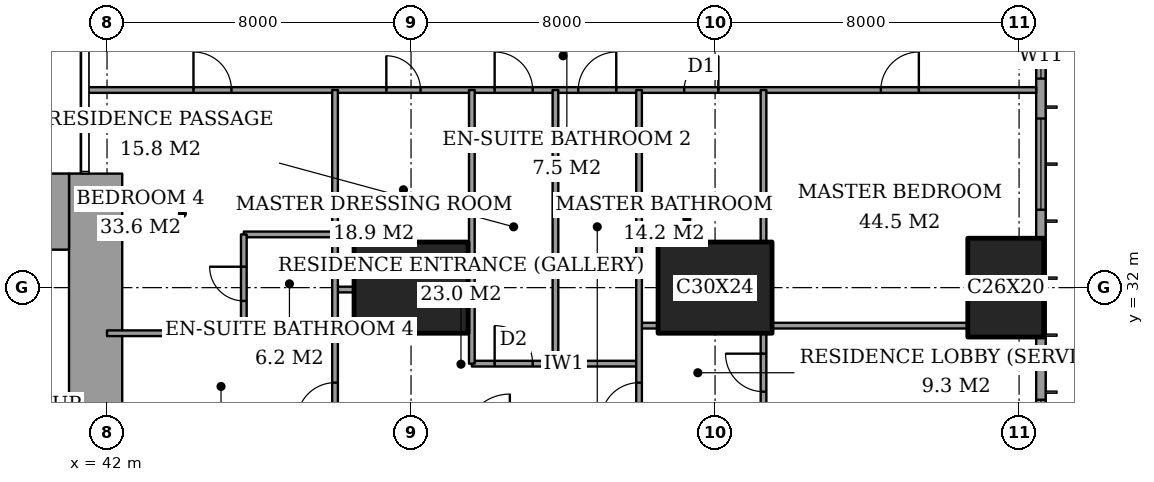
"""IFC4 building model, lengths in metres.
Left out: names, types, materials, properties, quantities, classifications, styles, units other than length and angle.
Written with IfcOpenShell. Run it as: python <this file> out.ifc"""

import sys

from ifc_helpers import new_model, si_unit, direction, frame, frame_2d, origin, origin_2d, place, context, subcontext, project, spatial, rectangle, extrude, element, fill, save


model = new_model("IFC4")
c1 = context("Model", 3, precision=1e-05, world=origin(), true_north=direction((0.0, 1.0)))
c2 = subcontext(c1, "Body", "Model", "MODEL_VIEW")
j1 = project(units=[si_unit("LENGTHUNIT", "METRE"), si_unit("PLANEANGLEUNIT", "RADIAN")], contexts=[c1])
p1 = place(None, origin())
s1 = spatial("IfcSite", under=j1, at=p1, CompositionType="ELEMENT")
p2 = place(p1, origin())
s2 = spatial("IfcBuilding", under=s1, at=p2, CompositionType="ELEMENT")
p3 = place(p2, frame((0.0, 0.0, 143.0)))
s3 = spatial("IfcBuildingStorey", under=s2, at=p3, CompositionType="ELEMENT", Elevation=143.0)
for number, where, z_axis, x_axis in (
    (1, (50.0, 32.0, 0.0), (0.0, 0.0, 1.0), (1.0, 0.0, 0.0)),
    (2, (58.0, 32.0, 0.0), (0.0, 0.0, 1.0), (1.0, 0.0, 0.0)),
):
    element("IfcColumn", number, at=place(p3, frame(where, z_axis=z_axis, x_axis=x_axis)), inside=s3, PredefinedType="COLUMN", context=c2, shape_type="SweptSolid", body=[
        extrude(rectangle(XDim=3.0, YDim=2.4, at=origin_2d()), origin(), (0.0, 0.0, 1.0), 3.6),
    ])
p4 = place(p3, frame((65.65, 32.0, 0.0), z_axis=(0.0, 0.0, 1.0), x_axis=(0.0, 1.0, 0.0)))
e3 = element("IfcColumn", 3, at=p4, inside=s3, PredefinedType="COLUMN", context=c2, shape_type="SweptSolid", body=[
    extrude(rectangle(XDim=2.6, YDim=2.0, at=origin_2d()), origin(), (0.0, 0.0, 1.0), 3.6),
])
p5 = place(p3, frame((37.85, 34.0, 0.0), z_axis=(0.0, 0.0, 1.0), x_axis=(1.0, 0.0, 0.0)))
e4 = element("IfcWall", 4, at=p5, inside=s3, PredefinedType="SHEAR", context=c2, shape_type="SweptSolid", body=[
    extrude(rectangle(XDim=3.15, YDim=2.0, at=frame_2d((1.575, 0.0))), origin(), (0.0, 0.0, 1.0), 3.6),
])
p6 = place(p3, frame((41.7, 24.85, 0.0), z_axis=(0.0, 0.0, 1.0), x_axis=(0.0, 1.0, 0.0)))
e5 = element("IfcWall", 5, at=p6, inside=s3, PredefinedType="SHEAR", context=c2, shape_type="SweptSolid", body=[
    extrude(rectangle(XDim=10.15, YDim=1.4, at=frame_2d((5.075, 0.0))), origin(), (0.0, 0.0, 1.0), 3.6),
])
p7 = place(p3, frame((66.575, 3.175, 0.0), z_axis=(0.0, 0.0, 1.0), x_axis=(0.0, 1.0, 0.0)))
e6 = element("IfcWall", 6, at=p7, inside=s3, PredefinedType="SOLIDWALL", context=c2, shape_type="SweptSolid", body=[
    extrude(rectangle(XDim=41.65, YDim=0.25, at=frame_2d((20.825, 0.0))), origin(), (0.0, 0.0, 1.0), 3.6),
])
p8 = place(p7, frame((0.775, 0.0, 0.4)))
e7 = element("IfcOpeningElement", 7, at=p8, cuts=e6, PredefinedType="OPENING", context=c2, shape_type="SweptSolid", body=[
    extrude(rectangle(XDim=2.4, YDim=2.2, at=frame_2d((1.2, 1.1))), frame((0.0, 0.135, 0.0), z_axis=(0.0, -1.0, 0.0), x_axis=(1.0, 0.0, 0.0)), (0.0, 0.0, 1.0), 0.27),
])
p9 = place(p7, frame((6.1, 0.0, 0.4)))
e8 = element("IfcOpeningElement", 8, at=p9, cuts=e6, PredefinedType="OPENING", context=c2, shape_type="SweptSolid", body=[
    extrude(rectangle(XDim=1.2, YDim=2.2, at=frame_2d((0.6, 1.1))), frame((0.0, 0.135, 0.0), z_axis=(0.0, -1.0, 0.0), x_axis=(1.0, 0.0, 0.0)), (0.0, 0.0, 1.0), 0.27),
])
p10 = place(p7, frame((8.275, 0.0, 0.4)))
e9 = element("IfcOpeningElement", 9, at=p10, cuts=e6, PredefinedType="OPENING", context=c2, shape_type="SweptSolid", body=[
    extrude(rectangle(XDim=2.4, YDim=2.2, at=frame_2d((1.2, 1.1))), frame((0.0, 0.135, 0.0), z_axis=(0.0, -1.0, 0.0), x_axis=(1.0, 0.0, 0.0)), (0.0, 0.0, 1.0), 0.27),
])
p11 = place(p7, frame((15.775, 0.0, 0.4)))
e10 = element("IfcOpeningElement", 10, at=p11, cuts=e6, PredefinedType="OPENING", context=c2, shape_type="SweptSolid", body=[
    extrude(rectangle(XDim=2.4, YDim=2.2, at=frame_2d((1.2, 1.1))), frame((0.0, 0.135, 0.0), z_axis=(0.0, -1.0, 0.0), x_axis=(1.0, 0.0, 0.0)), (0.0, 0.0, 1.0), 0.27),
])
p12 = place(p7, frame((23.475, 0.0, 0.4)))
e11 = element("IfcOpeningElement", 11, at=p12, cuts=e6, PredefinedType="OPENING", context=c2, shape_type="SweptSolid", body=[
    extrude(rectangle(XDim=2.4, YDim=2.2, at=frame_2d((1.2, 1.1))), frame((0.0, 0.135, 0.0), z_axis=(0.0, -1.0, 0.0), x_axis=(1.0, 0.0, 0.0)), (0.0, 0.0, 1.0), 0.27),
])
p13 = place(p7, frame((30.875, 0.0, 0.4)))
e12 = element("IfcOpeningElement", 12, at=p13, cuts=e6, PredefinedType="OPENING", context=c2, shape_type="SweptSolid", body=[
    extrude(rectangle(XDim=2.4, YDim=2.2, at=frame_2d((1.2, 1.1))), frame((0.0, 0.135, 0.0), z_axis=(0.0, -1.0, 0.0), x_axis=(1.0, 0.0, 0.0)), (0.0, 0.0, 1.0), 0.27),
])
p14 = place(p7, frame((34.325, 0.0, 0.4)))
e13 = element("IfcOpeningElement", 13, at=p14, cuts=e6, PredefinedType="OPENING", context=c2, shape_type="SweptSolid", body=[
    extrude(rectangle(XDim=1.2, YDim=2.2, at=frame_2d((0.6, 1.1))), frame((0.0, 0.135, 0.0), z_axis=(0.0, -1.0, 0.0), x_axis=(1.0, 0.0, 0.0)), (0.0, 0.0, 1.0), 0.27),
])
p15 = place(p7, frame((38.475, 0.0, 0.4)))
e14 = element("IfcOpeningElement", 14, at=p15, cuts=e6, PredefinedType="OPENING", context=c2, shape_type="SweptSolid", body=[
    extrude(rectangle(XDim=2.4, YDim=2.2, at=frame_2d((1.2, 1.1))), frame((0.0, 0.135, 0.0), z_axis=(0.0, -1.0, 0.0), x_axis=(1.0, 0.0, 0.0)), (0.0, 0.0, 1.0), 0.27),
])
p16 = place(p3, frame((51.6, 30.0, 0.0), z_axis=(0.0, 0.0, 1.0), x_axis=(1.0, 0.0, 0.0)))
e15 = element("IfcWall", 15, at=p16, inside=s3, PredefinedType="PARTITIONING", context=c2, shape_type="SweptSolid", body=[
    extrude(rectangle(XDim=4.4, YDim=0.15, at=frame_2d((2.2, 0.0))), origin(), (0.0, 0.0, 1.0), 3.35),
])
p17 = place(p16, frame((0.6, 0.0, 0.0)))
e16 = element("IfcOpeningElement", 16, at=p17, cuts=e15, PredefinedType="OPENING", context=c2, shape_type="SweptSolid", body=[
    extrude(rectangle(XDim=1.0, YDim=2.1, at=frame_2d((0.5, 1.05))), frame((0.0, 0.085, 0.0), z_axis=(0.0, -1.0, 0.0), x_axis=(1.0, 0.0, 0.0)), (0.0, 0.0, 1.0), 0.17),
])
p18 = place(p3, frame((42.0, 30.8, 0.0), z_axis=(0.0, 0.0, 1.0), x_axis=(1.0, 0.0, 0.0)))
e17 = element("IfcWall", 17, at=p18, inside=s3, PredefinedType="PARTITIONING", context=c2, shape_type="SweptSolid", body=[
    extrude(rectangle(XDim=6.0, YDim=0.15, at=frame_2d((3.0, 0.0))), origin(), (0.0, 0.0, 1.0), 3.35),
])
p19 = place(p3, frame((56.0, 31.0, 0.0), z_axis=(0.0, 0.0, 1.0), x_axis=(1.0, 0.0, 0.0)))
e18 = element("IfcWall", 18, at=p19, inside=s3, PredefinedType="PARTITIONING", context=c2, shape_type="SweptSolid", body=[
    extrude(rectangle(XDim=0.5, YDim=0.15, at=frame_2d((0.25, 0.0))), origin(), (0.0, 0.0, 1.0), 3.35),
])
p20 = place(p3, frame((59.5, 31.0, 0.0), z_axis=(0.0, 0.0, 1.0), x_axis=(1.0, 0.0, 0.0)))
e19 = element("IfcWall", 19, at=p20, inside=s3, PredefinedType="PARTITIONING", context=c2, shape_type="SweptSolid", body=[
    extrude(rectangle(XDim=5.15, YDim=0.15, at=frame_2d((2.575, 0.0))), origin(), (0.0, 0.0, 1.0), 3.35),
])
p21 = place(p3, frame((48.0, 31.95, 0.0), z_axis=(0.0, 0.0, 1.0), x_axis=(1.0, 0.0, 0.0)))
e20 = element("IfcWall", 20, at=p21, inside=s3, PredefinedType="PARTITIONING", context=c2, shape_type="SweptSolid", body=[
    extrude(rectangle(XDim=0.5, YDim=0.15, at=frame_2d((0.25, 0.0))), origin(), (0.0, 0.0, 1.0), 2.634),
])
p22 = place(p3, frame((45.6, 33.4, 0.0), z_axis=(0.0, 0.0, 1.0), x_axis=(1.0, 0.0, 0.0)))
e21 = element("IfcWall", 21, at=p22, inside=s3, PredefinedType="PARTITIONING", context=c2, shape_type="SweptSolid", body=[
    extrude(rectangle(XDim=2.4, YDim=0.15, at=frame_2d((1.2, 0.0))), origin(), (0.0, 0.0, 1.0), 3.35),
])
p23 = place(p3, frame((41.439, 37.2, 0.0), z_axis=(0.0, 0.0, 1.0), x_axis=(1.0, 0.0, 0.0)))
e22 = element("IfcWall", 22, at=p23, inside=s3, PredefinedType="PARTITIONING", context=c2, shape_type="SweptSolid", body=[
    extrude(rectangle(XDim=25.011, YDim=0.15, at=frame_2d((12.505, 0.0))), origin(), (0.0, 0.0, 1.0), 3.35),
])
p24 = place(p23, frame((10.761, 0.0, 0.0)))
e23 = element("IfcOpeningElement", 23, at=p24, cuts=e22, PredefinedType="OPENING", context=c2, shape_type="SweptSolid", body=[
    extrude(rectangle(XDim=1.0, YDim=2.1, at=frame_2d((0.5, 1.05))), frame((0.0, 0.085, 0.0), z_axis=(0.0, -1.0, 0.0), x_axis=(1.0, 0.0, 0.0)), (0.0, 0.0, 1.0), 0.17),
])
p25 = place(p23, frame((20.924, 0.0, 0.0)))
e24 = element("IfcOpeningElement", 24, at=p25, cuts=e22, PredefinedType="OPENING", context=c2, shape_type="SweptSolid", body=[
    extrude(rectangle(XDim=1.0, YDim=2.1, at=frame_2d((0.5, 1.05))), frame((0.0, 0.085, 0.0), z_axis=(0.0, -1.0, 0.0), x_axis=(1.0, 0.0, 0.0)), (0.0, 0.0, 1.0), 0.17),
])
p26 = place(p23, frame((15.749, 0.0, 0.0)))
e25 = element("IfcOpeningElement", 25, at=p26, cuts=e22, PredefinedType="OPENING", context=c2, shape_type="SweptSolid", body=[
    extrude(rectangle(XDim=0.9, YDim=2.1, at=frame_2d((0.45, 1.05))), frame((0.0, 0.085, 0.0), z_axis=(0.0, -1.0, 0.0), x_axis=(1.0, 0.0, 0.0)), (0.0, 0.0, 1.0), 0.17),
])
p27 = place(p23, frame((12.961, 0.0, 0.0)))
e26 = element("IfcOpeningElement", 26, at=p27, cuts=e22, PredefinedType="OPENING", context=c2, shape_type="SweptSolid", body=[
    extrude(rectangle(XDim=1.0, YDim=2.1, at=frame_2d((0.5, 1.05))), frame((0.0, 0.085, 0.0), z_axis=(0.0, -1.0, 0.0), x_axis=(1.0, 0.0, 0.0)), (0.0, 0.0, 1.0), 0.17),
])
p28 = place(p23, frame((7.911, 0.0, 0.0)))
e27 = element("IfcOpeningElement", 27, at=p28, cuts=e22, PredefinedType="OPENING", context=c2, shape_type="SweptSolid", body=[
    extrude(rectangle(XDim=0.9, YDim=2.1, at=frame_2d((0.45, 1.05))), frame((0.0, 0.085, 0.0), z_axis=(0.0, -1.0, 0.0), x_axis=(1.0, 0.0, 0.0)), (0.0, 0.0, 1.0), 0.17),
])
p29 = place(p23, frame((2.836, 0.0, 0.0)))
e28 = element("IfcOpeningElement", 28, at=p29, cuts=e22, PredefinedType="OPENING", context=c2, shape_type="SweptSolid", body=[
    extrude(rectangle(XDim=1.0, YDim=2.1, at=frame_2d((0.5, 1.05))), frame((0.0, 0.085, 0.0), z_axis=(0.0, -1.0, 0.0), x_axis=(1.0, 0.0, 0.0)), (0.0, 0.0, 1.0), 0.17),
])
p30 = place(p3, frame((45.6, 30.8, 0.0), z_axis=(0.0, 0.0, 1.0), x_axis=(0.0, 1.0, 0.0)))
e29 = element("IfcWall", 29, at=p30, inside=s3, PredefinedType="PARTITIONING", context=c2, shape_type="SweptSolid", body=[
    extrude(rectangle(XDim=2.6, YDim=0.15, at=frame_2d((1.3, 0.0))), origin(), (0.0, 0.0, 1.0), 3.35),
])
p31 = place(p30, frame((0.85, 0.0, 0.0)))
e30 = element("IfcOpeningElement", 30, at=p31, cuts=e29, PredefinedType="OPENING", context=c2, shape_type="SweptSolid", body=[
    extrude(rectangle(XDim=0.9, YDim=2.1, at=frame_2d((0.45, 1.05))), frame((0.0, 0.085, 0.0), z_axis=(0.0, -1.0, 0.0), x_axis=(1.0, 0.0, 0.0)), (0.0, 0.0, 1.0), 0.17),
])
p32 = place(p3, frame((48.0, 28.0, 0.0), z_axis=(0.0, 0.0, 1.0), x_axis=(0.0, 1.0, 0.0)))
e31 = element("IfcWall", 31, at=p32, inside=s3, PredefinedType="PARTITIONING", context=c2, shape_type="SweptSolid", body=[
    extrude(rectangle(XDim=9.2, YDim=0.15, at=frame_2d((4.6, 0.0))), origin(), (0.0, 0.0, 1.0), 3.35),
])
p33 = place(p32, frame((0.5, 0.0, 0.0)))
e32 = element("IfcOpeningElement", 32, at=p33, cuts=e31, PredefinedType="OPENING", context=c2, shape_type="SweptSolid", body=[
    extrude(rectangle(XDim=1.0, YDim=2.1, at=frame_2d((0.5, 1.05))), frame((0.0, 0.085, 0.0), z_axis=(0.0, -1.0, 0.0), x_axis=(1.0, 0.0, 0.0)), (0.0, 0.0, 1.0), 0.17),
])
for number, where, z_axis, x_axis in (
    (33, (51.6, 30.0, 0.0), (0.0, 0.0, 1.0), (0.0, 1.0, 0.0)),
    (34, (53.8, 30.0, 0.0), (0.0, 0.0, 1.0), (0.0, 1.0, 0.0)),
):
    element("IfcWall", number, at=place(p3, frame(where, z_axis=z_axis, x_axis=x_axis)), inside=s3, PredefinedType="PARTITIONING", context=c2, shape_type="SweptSolid", body=[
        extrude(rectangle(XDim=7.2, YDim=0.15, at=frame_2d((3.6, 0.0))), origin(), (0.0, 0.0, 1.0), 3.35),
    ])
p34 = place(p3, frame((56.0, 28.0, 0.0), z_axis=(0.0, 0.0, 1.0), x_axis=(0.0, 1.0, 0.0)))
e35 = element("IfcWall", 35, at=p34, inside=s3, PredefinedType="PARTITIONING", context=c2, shape_type="SweptSolid", body=[
    extrude(rectangle(XDim=9.2, YDim=0.15, at=frame_2d((4.6, 0.0))), origin(), (0.0, 0.0, 1.0), 3.35),
])
p35 = place(p34, frame((0.5, 0.0, 0.0)))
e36 = element("IfcOpeningElement", 36, at=p35, cuts=e35, PredefinedType="OPENING", context=c2, shape_type="SweptSolid", body=[
    extrude(rectangle(XDim=1.0, YDim=2.1, at=frame_2d((0.5, 1.05))), frame((0.0, 0.085, 0.0), z_axis=(0.0, -1.0, 0.0), x_axis=(1.0, 0.0, 0.0)), (0.0, 0.0, 1.0), 0.17),
])
p36 = place(p3, frame((59.275, 28.35, 0.0), z_axis=(0.0, 0.0, 1.0), x_axis=(0.0, 1.0, 0.0)))
e37 = element("IfcWall", 37, at=p36, inside=s3, PredefinedType="PARTITIONING", context=c2, shape_type="SweptSolid", body=[
    extrude(rectangle(XDim=2.45, YDim=0.15, at=frame_2d((1.225, 0.0))), origin(), (0.0, 0.0, 1.0), 3.35),
])
p37 = place(p36, frame((0.913, 0.0, 0.0)))
e38 = element("IfcOpeningElement", 38, at=p37, cuts=e37, PredefinedType="OPENING", context=c2, shape_type="SweptSolid", body=[
    extrude(rectangle(XDim=1.0, YDim=2.1, at=frame_2d((0.5, 1.05))), frame((0.0, 0.085, 0.0), z_axis=(0.0, -1.0, 0.0), x_axis=(1.0, 0.0, 0.0)), (0.0, 0.0, 1.0), 0.17),
])
p38 = place(p3, frame((59.275, 33.2, 0.0), z_axis=(0.0, 0.0, 1.0), x_axis=(0.0, 1.0, 0.0)))
e39 = element("IfcWall", 39, at=p38, inside=s3, PredefinedType="PARTITIONING", context=c2, shape_type="SweptSolid", body=[
    extrude(rectangle(XDim=4.0, YDim=0.15, at=frame_2d((2.0, 0.0))), origin(), (0.0, 0.0, 1.0), 3.35),
])
p39 = place(p12, origin())
e40 = element("IfcWindow", 40, at=p39, inside=s3, PartitioningType="SINGLE_PANEL", PredefinedType="WINDOW", context=c2, shape_type="SweptSolid", body=[
    extrude(rectangle(XDim=2.4, YDim=2.2, at=frame_2d((1.2, 1.1))), frame((0.0, 0.03, 0.0), z_axis=(0.0, -1.0, 0.0), x_axis=(1.0, 0.0, 0.0)), (0.0, 0.0, 1.0), 0.06),
])
fill(e11, e40)
p40 = place(p13, origin())
e41 = element("IfcWindow", 41, at=p40, inside=s3, PartitioningType="SINGLE_PANEL", PredefinedType="WINDOW", context=c2, shape_type="SweptSolid", body=[
    extrude(rectangle(XDim=2.4, YDim=2.2, at=frame_2d((1.2, 1.1))), frame((0.0, 0.03, 0.0), z_axis=(0.0, -1.0, 0.0), x_axis=(1.0, 0.0, 0.0)), (0.0, 0.0, 1.0), 0.06),
])
fill(e12, e41)
p41 = place(p14, origin())
e42 = element("IfcWindow", 42, at=p41, inside=s3, PartitioningType="SINGLE_PANEL", PredefinedType="WINDOW", context=c2, shape_type="SweptSolid", body=[
    extrude(rectangle(XDim=1.2, YDim=2.2, at=frame_2d((0.6, 1.1))), frame((0.0, 0.03, 0.0), z_axis=(0.0, -1.0, 0.0), x_axis=(1.0, 0.0, 0.0)), (0.0, 0.0, 1.0), 0.06),
])
fill(e13, e42)
p42 = place(p24, origin())
e43 = element("IfcDoor", 43, at=p42, inside=s3, OperationType="SINGLE_SWING_RIGHT", PredefinedType="DOOR", context=c2, shape_type="SweptSolid", body=[
    extrude(rectangle(XDim=1.0, YDim=2.1, at=frame_2d((0.5, 1.05))), frame((0.0, 0.025, 0.0), z_axis=(0.0, -1.0, 0.0), x_axis=(1.0, 0.0, 0.0)), (0.0, 0.0, 1.0), 0.05),
])
fill(e23, e43)
p43 = place(p25, origin())
e44 = element("IfcDoor", 44, at=p43, inside=s3, OperationType="SINGLE_SWING_LEFT", PredefinedType="DOOR", context=c2, shape_type="SweptSolid", body=[
    extrude(rectangle(XDim=1.0, YDim=2.1, at=frame_2d((0.5, 1.05))), frame((0.0, 0.025, 0.0), z_axis=(0.0, -1.0, 0.0), x_axis=(1.0, 0.0, 0.0)), (0.0, 0.0, 1.0), 0.05),
])
fill(e24, e44)
p44 = place(p37, origin())
e45 = element("IfcDoor", 45, at=p44, inside=s3, OperationType="SINGLE_SWING_LEFT", PredefinedType="DOOR", context=c2, shape_type="SweptSolid", body=[
    extrude(rectangle(XDim=1.0, YDim=2.1, at=frame_2d((0.5, 1.05))), frame((0.0, 0.025, 0.0), z_axis=(0.0, -1.0, 0.0), x_axis=(1.0, 0.0, 0.0)), (0.0, 0.0, 1.0), 0.05),
])
fill(e38, e45)
p45 = place(p26, origin())
e46 = element("IfcDoor", 46, at=p45, inside=s3, OperationType="SINGLE_SWING_LEFT", PredefinedType="DOOR", context=c2, shape_type="SweptSolid", body=[
    extrude(rectangle(XDim=0.9, YDim=2.1, at=frame_2d((0.45, 1.05))), frame((0.0, 0.025, 0.0), z_axis=(0.0, -1.0, 0.0), x_axis=(1.0, 0.0, 0.0)), (0.0, 0.0, 1.0), 0.05),
])
fill(e25, e46)
p46 = place(p35, origin())
e47 = element("IfcDoor", 47, at=p46, inside=s3, OperationType="SINGLE_SWING_RIGHT", PredefinedType="DOOR", context=c2, shape_type="SweptSolid", body=[
    extrude(rectangle(XDim=1.0, YDim=2.1, at=frame_2d((0.5, 1.05))), frame((0.0, 0.025, 0.0), z_axis=(0.0, -1.0, 0.0), x_axis=(1.0, 0.0, 0.0)), (0.0, 0.0, 1.0), 0.05),
])
fill(e36, e47)
p47 = place(p27, origin())
e48 = element("IfcDoor", 48, at=p47, inside=s3, OperationType="SINGLE_SWING_LEFT", PredefinedType="DOOR", context=c2, shape_type="SweptSolid", body=[
    extrude(rectangle(XDim=1.0, YDim=2.1, at=frame_2d((0.5, 1.05))), frame((0.0, 0.025, 0.0), z_axis=(0.0, -1.0, 0.0), x_axis=(1.0, 0.0, 0.0)), (0.0, 0.0, 1.0), 0.05),
])
fill(e26, e48)
p48 = place(p17, origin())
e49 = element("IfcDoor", 49, at=p48, inside=s3, OperationType="SINGLE_SWING_RIGHT", PredefinedType="DOOR", context=c2, shape_type="SweptSolid", body=[
    extrude(rectangle(XDim=1.0, YDim=2.1, at=frame_2d((0.5, 1.05))), frame((0.0, 0.025, 0.0), z_axis=(0.0, -1.0, 0.0), x_axis=(1.0, 0.0, 0.0)), (0.0, 0.0, 1.0), 0.05),
])
fill(e16, e49)
p49 = place(p28, origin())
e50 = element("IfcDoor", 50, at=p49, inside=s3, OperationType="SINGLE_SWING_RIGHT", PredefinedType="DOOR", context=c2, shape_type="SweptSolid", body=[
    extrude(rectangle(XDim=0.9, YDim=2.1, at=frame_2d((0.45, 1.05))), frame((0.0, 0.025, 0.0), z_axis=(0.0, -1.0, 0.0), x_axis=(1.0, 0.0, 0.0)), (0.0, 0.0, 1.0), 0.05),
])
fill(e27, e50)
p50 = place(p31, origin())
e51 = element("IfcDoor", 51, at=p50, inside=s3, OperationType="SINGLE_SWING_LEFT", PredefinedType="DOOR", context=c2, shape_type="SweptSolid", body=[
    extrude(rectangle(XDim=0.9, YDim=2.1, at=frame_2d((0.45, 1.05))), frame((0.0, 0.025, 0.0), z_axis=(0.0, -1.0, 0.0), x_axis=(1.0, 0.0, 0.0)), (0.0, 0.0, 1.0), 0.05),
])
fill(e30, e51)
p51 = place(p29, origin())
e52 = element("IfcDoor", 52, at=p51, inside=s3, OperationType="SINGLE_SWING_RIGHT", PredefinedType="DOOR", context=c2, shape_type="SweptSolid", body=[
    extrude(rectangle(XDim=1.0, YDim=2.1, at=frame_2d((0.5, 1.05))), frame((0.0, 0.025, 0.0), z_axis=(0.0, -1.0, 0.0), x_axis=(1.0, 0.0, 0.0)), (0.0, 0.0, 1.0), 0.05),
])
fill(e28, e52)
p52 = place(p33, origin())
e53 = element("IfcDoor", 53, at=p52, inside=s3, OperationType="SINGLE_SWING_RIGHT", PredefinedType="DOOR", context=c2, shape_type="SweptSolid", body=[
    extrude(rectangle(XDim=1.0, YDim=2.1, at=frame_2d((0.5, 1.05))), frame((0.0, 0.025, 0.0), z_axis=(0.0, -1.0, 0.0), x_axis=(1.0, 0.0, 0.0)), (0.0, 0.0, 1.0), 0.05),
])
fill(e32, e53)
save(model, sys.argv[1])
